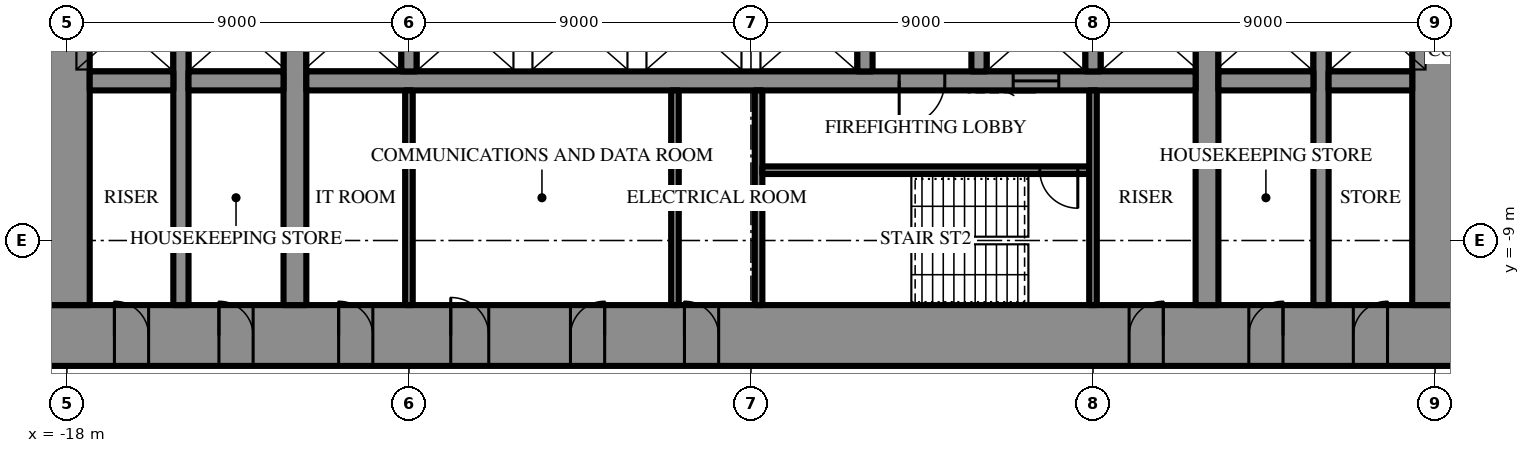
"""IFC4 building model, lengths in metres.
Left out: names, types, materials, properties, quantities, classifications, styles, units other than length and angle.
Written with IfcOpenShell. Run it as: python <this file> out.ifc"""

import sys

from ifc_helpers import new_model, si_unit, direction, frame, frame_2d, origin, place, context, subcontext, project, spatial, rectangle, extrude, element, fill, save


model = new_model("IFC4")
c1 = context("Model", 3, precision=1e-05, world=origin(), true_north=direction((0.0, 1.0)))
c2 = subcontext(c1, "Body", "Model", "MODEL_VIEW")
j1 = project(units=[si_unit("LENGTHUNIT", "METRE"), si_unit("PLANEANGLEUNIT", "RADIAN")], contexts=[c1])
p1 = place(None, origin())
s1 = spatial("IfcSite", under=j1, at=p1, CompositionType="ELEMENT")
p2 = place(p1, origin())
s2 = spatial("IfcBuilding", under=s1, at=p2, CompositionType="ELEMENT")
p3 = place(p2, frame((0.0, 0.0, 61.3)))
s3 = spatial("IfcBuildingStorey", under=s2, at=p3, CompositionType="ELEMENT", Elevation=61.3)
p4 = place(p3, frame((18.6, -11.5, 0.0), z_axis=(0.0, 0.0, 1.0), x_axis=(-1.0, 0.0, 0.0)))
e1 = element("IfcWall", 1, at=p4, inside=s3, PredefinedType="SHEAR", context=c2, shape_type="SweptSolid", body=[
    extrude(rectangle(XDim=37.2, YDim=1.6, at=frame_2d((18.6, 0.0))), origin(), (0.0, 0.0, 1.0), 4.2),
])
p5 = place(p4, frame((19.45, 0.0, 0.0)))
e2 = element("IfcOpeningElement", 2, at=p5, cuts=e1, PredefinedType="OPENING", context=c2, shape_type="SweptSolid", body=[
    extrude(rectangle(XDim=0.9, YDim=2.2, at=frame_2d((0.45, 1.1))), frame((0.0, 0.81, 0.0), z_axis=(0.0, -1.0, 0.0), x_axis=(1.0, 0.0, 0.0)), (0.0, 0.0, 1.0), 1.62),
])
p6 = place(p4, frame((22.45, 0.0, 0.0)))
e3 = element("IfcOpeningElement", 3, at=p6, cuts=e1, PredefinedType="OPENING", context=c2, shape_type="SweptSolid", body=[
    extrude(rectangle(XDim=0.9, YDim=2.2, at=frame_2d((0.45, 1.1))), frame((0.0, 0.81, 0.0), z_axis=(0.0, -1.0, 0.0), x_axis=(1.0, 0.0, 0.0)), (0.0, 0.0, 1.0), 1.62),
])
p7 = place(p4, frame((25.5, 0.0, 0.0)))
e4 = element("IfcOpeningElement", 4, at=p7, cuts=e1, PredefinedType="OPENING", context=c2, shape_type="SweptSolid", body=[
    extrude(rectangle(XDim=1.0, YDim=2.2, at=frame_2d((0.5, 1.1))), frame((0.0, 0.81, 0.0), z_axis=(0.0, -1.0, 0.0), x_axis=(1.0, 0.0, 0.0)), (0.0, 0.0, 1.0), 1.62),
])
p8 = place(p4, frame((1.85, 0.0, 0.0)))
e5 = element("IfcOpeningElement", 5, at=p8, cuts=e1, PredefinedType="OPENING", context=c2, shape_type="SweptSolid", body=[
    extrude(rectangle(XDim=0.9, YDim=2.2, at=frame_2d((0.45, 1.1))), frame((0.0, 0.81, 0.0), z_axis=(0.0, -1.0, 0.0), x_axis=(1.0, 0.0, 0.0)), (0.0, 0.0, 1.0), 1.62),
])
p9 = place(p4, frame((4.6, 0.0, 0.0)))
e6 = element("IfcOpeningElement", 6, at=p9, cuts=e1, PredefinedType="OPENING", context=c2, shape_type="SweptSolid", body=[
    extrude(rectangle(XDim=0.9, YDim=2.2, at=frame_2d((0.45, 1.1))), frame((0.0, 0.81, 0.0), z_axis=(0.0, -1.0, 0.0), x_axis=(1.0, 0.0, 0.0)), (0.0, 0.0, 1.0), 1.62),
])
p10 = place(p4, frame((7.75, 0.0, 0.0)))
e7 = element("IfcOpeningElement", 7, at=p10, cuts=e1, PredefinedType="OPENING", context=c2, shape_type="SweptSolid", body=[
    extrude(rectangle(XDim=0.9, YDim=2.2, at=frame_2d((0.45, 1.1))), frame((0.0, 0.81, 0.0), z_axis=(0.0, -1.0, 0.0), x_axis=(1.0, 0.0, 0.0)), (0.0, 0.0, 1.0), 1.62),
])
p11 = place(p4, frame((28.55, 0.0, 0.0)))
e8 = element("IfcOpeningElement", 8, at=p11, cuts=e1, PredefinedType="OPENING", context=c2, shape_type="SweptSolid", body=[
    extrude(rectangle(XDim=0.9, YDim=2.2, at=frame_2d((0.45, 1.1))), frame((0.0, 0.81, 0.0), z_axis=(0.0, -1.0, 0.0), x_axis=(1.0, 0.0, 0.0)), (0.0, 0.0, 1.0), 1.62),
])
p12 = place(p4, frame((31.7, 0.0, 0.0)))
e9 = element("IfcOpeningElement", 9, at=p12, cuts=e1, PredefinedType="OPENING", context=c2, shape_type="SweptSolid", body=[
    extrude(rectangle(XDim=0.9, YDim=2.2, at=frame_2d((0.45, 1.1))), frame((0.0, 0.81, 0.0), z_axis=(0.0, -1.0, 0.0), x_axis=(1.0, 0.0, 0.0)), (0.0, 0.0, 1.0), 1.62),
])
p13 = place(p4, frame((34.45, 0.0, 0.0)))
e10 = element("IfcOpeningElement", 10, at=p13, cuts=e1, PredefinedType="OPENING", context=c2, shape_type="SweptSolid", body=[
    extrude(rectangle(XDim=0.9, YDim=2.2, at=frame_2d((0.45, 1.1))), frame((0.0, 0.81, 0.0), z_axis=(0.0, -1.0, 0.0), x_axis=(1.0, 0.0, 0.0)), (0.0, 0.0, 1.0), 1.62),
])
p14 = place(p3, frame((18.0, -10.7, 0.0), z_axis=(0.0, 0.0, 1.0), x_axis=(0.0, 1.0, 0.0)))
e11 = element("IfcWall", 11, at=p14, inside=s3, PredefinedType="SHEAR", context=c2, shape_type="SweptSolid", body=[
    extrude(rectangle(XDim=21.4, YDim=1.2, at=frame_2d((10.7, 0.0))), origin(), (0.0, 0.0, 1.0), 4.2),
])
p15 = place(p14, frame((9.8, 0.0, 0.0)))
e12 = element("IfcOpeningElement", 12, at=p15, cuts=e11, PredefinedType="OPENING", context=c2, shape_type="SweptSolid", body=[
    extrude(rectangle(XDim=1.8, YDim=2.4, at=frame_2d((0.9, 1.2))), frame((0.0, 0.61, 0.0), z_axis=(0.0, -1.0, 0.0), x_axis=(1.0, 0.0, 0.0)), (0.0, 0.0, 1.0), 1.22),
])
p16 = place(p3, frame((-18.0, 10.7, 0.0), z_axis=(0.0, 0.0, 1.0), x_axis=(0.0, -1.0, 0.0)))
e13 = element("IfcWall", 13, at=p16, inside=s3, PredefinedType="SHEAR", context=c2, shape_type="SweptSolid", body=[
    extrude(rectangle(XDim=21.4, YDim=1.2, at=frame_2d((10.7, 0.0))), origin(), (0.0, 0.0, 1.0), 4.2),
])
p17 = place(p16, frame((9.8, 0.0, 0.0)))
e14 = element("IfcOpeningElement", 14, at=p17, cuts=e13, PredefinedType="OPENING", context=c2, shape_type="SweptSolid", body=[
    extrude(rectangle(XDim=1.8, YDim=2.4, at=frame_2d((0.9, 1.2))), frame((0.0, 0.61, 0.0), z_axis=(0.0, -1.0, 0.0), x_axis=(1.0, 0.0, 0.0)), (0.0, 0.0, 1.0), 1.22),
])
p18 = place(p3, frame((12.0, -10.7, 0.0), z_axis=(0.0, 0.0, 1.0), x_axis=(0.0, 1.0, 0.0)))
e15 = element("IfcWall", 15, at=p18, inside=s3, PredefinedType="SHEAR", context=c2, shape_type="SweptSolid", body=[
    extrude(rectangle(XDim=21.4, YDim=0.6, at=frame_2d((10.7, 0.0))), origin(), (0.0, 0.0, 1.0), 4.2),
])
p19 = place(p18, frame((9.8, 0.0, 0.0)))
e16 = element("IfcOpeningElement", 16, at=p19, cuts=e15, PredefinedType="OPENING", context=c2, shape_type="SweptSolid", body=[
    extrude(rectangle(XDim=1.8, YDim=2.4, at=frame_2d((0.9, 1.2))), frame((0.0, 0.31, 0.0), z_axis=(0.0, -1.0, 0.0), x_axis=(1.0, 0.0, 0.0)), (0.0, 0.0, 1.0), 0.62),
])
p20 = place(p3, frame((-12.0, -10.7, 0.0), z_axis=(0.0, 0.0, 1.0), x_axis=(0.0, 1.0, 0.0)))
e17 = element("IfcWall", 17, at=p20, inside=s3, PredefinedType="SHEAR", context=c2, shape_type="SweptSolid", body=[
    extrude(rectangle(XDim=21.4, YDim=0.6, at=frame_2d((10.7, 0.0))), origin(), (0.0, 0.0, 1.0), 4.2),
])
p21 = place(p20, frame((9.8, 0.0, 0.0)))
e18 = element("IfcOpeningElement", 18, at=p21, cuts=e17, PredefinedType="OPENING", context=c2, shape_type="SweptSolid", body=[
    extrude(rectangle(XDim=1.8, YDim=2.4, at=frame_2d((0.9, 1.2))), frame((0.0, 0.31, 0.0), z_axis=(0.0, -1.0, 0.0), x_axis=(1.0, 0.0, 0.0)), (0.0, 0.0, 1.0), 0.62),
])
p22 = place(p3, frame((15.0, -10.7, 0.0), z_axis=(0.0, 0.0, 1.0), x_axis=(0.0, 1.0, 0.0)))
e19 = element("IfcWall", 19, at=p22, inside=s3, PredefinedType="SHEAR", context=c2, shape_type="SweptSolid", body=[
    extrude(rectangle(XDim=21.4, YDim=0.4, at=frame_2d((10.7, 0.0))), origin(), (0.0, 0.0, 1.0), 4.2),
])
p23 = place(p22, frame((9.8, 0.0, 0.0)))
e20 = element("IfcOpeningElement", 20, at=p23, cuts=e19, PredefinedType="OPENING", context=c2, shape_type="SweptSolid", body=[
    extrude(rectangle(XDim=1.8, YDim=2.4, at=frame_2d((0.9, 1.2))), frame((0.0, 0.21, 0.0), z_axis=(0.0, -1.0, 0.0), x_axis=(1.0, 0.0, 0.0)), (0.0, 0.0, 1.0), 0.42),
])
p24 = place(p3, frame((-15.0, -10.7, 0.0), z_axis=(0.0, 0.0, 1.0), x_axis=(0.0, 1.0, 0.0)))
e21 = element("IfcWall", 21, at=p24, inside=s3, PredefinedType="SHEAR", context=c2, shape_type="SweptSolid", body=[
    extrude(rectangle(XDim=21.4, YDim=0.4, at=frame_2d((10.7, 0.0))), origin(), (0.0, 0.0, 1.0), 4.2),
])
p25 = place(p24, frame((9.8, 0.0, 0.0)))
e22 = element("IfcOpeningElement", 22, at=p25, cuts=e21, PredefinedType="OPENING", context=c2, shape_type="SweptSolid", body=[
    extrude(rectangle(XDim=1.8, YDim=2.4, at=frame_2d((0.9, 1.2))), frame((0.0, 0.21, 0.0), z_axis=(0.0, -1.0, 0.0), x_axis=(1.0, 0.0, 0.0)), (0.0, 0.0, 1.0), 0.42),
])
p26 = place(p3, frame((17.4, -4.8, 0.0), z_axis=(0.0, 0.0, 1.0), x_axis=(-1.0, 0.0, 0.0)))
e23 = element("IfcWall", 23, at=p26, inside=s3, PredefinedType="SHEAR", context=c2, shape_type="SweptSolid", body=[
    extrude(rectangle(XDim=2.2, YDim=0.5, at=frame_2d((1.1, 0.0))), origin(), (0.0, 0.0, 1.0), 4.2),
])
p27 = place(p3, frame((14.8, -4.8, 0.0), z_axis=(0.0, 0.0, 1.0), x_axis=(-1.0, 0.0, 0.0)))
e24 = element("IfcWall", 24, at=p27, inside=s3, PredefinedType="SHEAR", context=c2, shape_type="SweptSolid", body=[
    extrude(rectangle(XDim=2.5, YDim=0.5, at=frame_2d((1.25, 0.0))), origin(), (0.0, 0.0, 1.0), 4.2),
])
p28 = place(p3, frame((11.7, -4.8, 0.0), z_axis=(0.0, 0.0, 1.0), x_axis=(-1.0, 0.0, 0.0)))
e25 = element("IfcWall", 25, at=p28, inside=s3, PredefinedType="SHEAR", context=c2, shape_type="SweptSolid", body=[
    extrude(rectangle(XDim=23.4, YDim=0.5, at=frame_2d((11.7, 0.0))), origin(), (0.0, 0.0, 1.0), 4.2),
])
p29 = place(p28, frame((6.6, 0.0, 0.0)))
e26 = element("IfcOpeningElement", 26, at=p29, cuts=e25, PredefinedType="OPENING", context=c2, shape_type="SweptSolid", body=[
    extrude(rectangle(XDim=1.2, YDim=2.2, at=frame_2d((0.6, 1.1))), frame((0.0, 0.26, 0.0), z_axis=(0.0, -1.0, 0.0), x_axis=(1.0, 0.0, 0.0)), (0.0, 0.0, 1.0), 0.52),
])
p30 = place(p28, frame((3.6, 0.0, 0.0)))
e27 = element("IfcOpeningElement", 27, at=p30, cuts=e25, PredefinedType="OPENING", context=c2, shape_type="SweptSolid", body=[
    extrude(rectangle(XDim=1.2, YDim=2.2, at=frame_2d((0.6, 1.1))), frame((0.0, 0.26, 0.0), z_axis=(0.0, -1.0, 0.0), x_axis=(1.0, 0.0, 0.0)), (0.0, 0.0, 1.0), 0.52),
])
p31 = place(p3, frame((-12.3, -4.8, 0.0), z_axis=(0.0, 0.0, 1.0), x_axis=(-1.0, 0.0, 0.0)))
e28 = element("IfcWall", 28, at=p31, inside=s3, PredefinedType="SHEAR", context=c2, shape_type="SweptSolid", body=[
    extrude(rectangle(XDim=2.5, YDim=0.5, at=frame_2d((1.25, 0.0))), origin(), (0.0, 0.0, 1.0), 4.2),
])
p32 = place(p3, frame((-15.2, -4.8, 0.0), z_axis=(0.0, 0.0, 1.0), x_axis=(-1.0, 0.0, 0.0)))
e29 = element("IfcWall", 29, at=p32, inside=s3, PredefinedType="SHEAR", context=c2, shape_type="SweptSolid", body=[
    extrude(rectangle(XDim=2.2, YDim=0.5, at=frame_2d((1.1, 0.0))), origin(), (0.0, 0.0, 1.0), 4.2),
])
for number, where, z_axis, x_axis in (
    (30, (9.0, -2.25, 0.0), (0.0, 0.0, 1.0), (0.0, -1.0, 0.0)),
    (31, (6.0, -2.25, 0.0), (0.0, 0.0, 1.0), (0.0, -1.0, 0.0)),
    (32, (3.0, -2.25, 0.0), (0.0, 0.0, 1.0), (0.0, -1.0, 0.0)),
    (33, (-9.0, -2.25, 0.0), (0.0, 0.0, 1.0), (0.0, -1.0, 0.0)),
):
    element("IfcWall", number, at=place(p3, frame(where, z_axis=z_axis, x_axis=x_axis)), inside=s3, PredefinedType="SHEAR", context=c2, shape_type="SweptSolid", body=[
        extrude(rectangle(XDim=2.3, YDim=0.4, at=frame_2d((1.15, 0.0))), origin(), (0.0, 0.0, 1.0), 4.2),
    ])
p33 = place(p3, frame((0.2, -5.05, 0.0), z_axis=(0.0, 0.0, 1.0), x_axis=(0.0, -1.0, 0.0)))
e34 = element("IfcWall", 34, at=p33, inside=s3, PredefinedType="SHEAR", context=c2, shape_type="SweptSolid", body=[
    extrude(rectangle(XDim=5.65, YDim=0.2, at=frame_2d((2.825, 0.0))), origin(), (0.0, 0.0, 1.0), 4.2),
])
p34 = place(p3, frame((8.9, -7.15, 0.0), z_axis=(0.0, 0.0, 1.0), x_axis=(-1.0, 0.0, 0.0)))
e35 = element("IfcWall", 35, at=p34, inside=s3, PredefinedType="SHEAR", context=c2, shape_type="SweptSolid", body=[
    extrude(rectangle(XDim=8.6, YDim=0.2, at=frame_2d((4.3, 0.0))), origin(), (0.0, 0.0, 1.0), 4.2),
])
p35 = place(p34, frame((0.3, 0.0, 0.0)))
e36 = element("IfcOpeningElement", 36, at=p35, cuts=e35, PredefinedType="OPENING", context=c2, shape_type="SweptSolid", body=[
    extrude(rectangle(XDim=1.0, YDim=2.2, at=frame_2d((0.5, 1.1))), frame((0.0, 0.11, 0.0), z_axis=(0.0, -1.0, 0.0), x_axis=(1.0, 0.0, 0.0)), (0.0, 0.0, 1.0), 0.22),
])
for number, where, z_axis, x_axis in (
    (37, (9.0, -5.05, 0.0), (0.0, 0.0, 1.0), (0.0, -1.0, 0.0)),
    (38, (-9.0, -5.05, 0.0), (0.0, 0.0, 1.0), (0.0, -1.0, 0.0)),
    (39, (-2.0, -5.05, 0.0), (0.0, 0.0, 1.0), (0.0, -1.0, 0.0)),
):
    element("IfcWall", number, at=place(p3, frame(where, z_axis=z_axis, x_axis=x_axis)), inside=s3, PredefinedType="PARTITIONING", context=c2, shape_type="SweptSolid", body=[
        extrude(rectangle(XDim=5.65, YDim=0.2, at=frame_2d((2.825, 0.0))), origin(), (0.0, 0.0, 1.0), 4.0),
    ])
p36 = place(p3, frame((17.511, -22.67, 0.0), z_axis=(0.0, 0.0, 1.0), x_axis=(0.500000289772, 0.866025236485, 0.0)))
e40 = element("IfcWall", 40, at=p36, inside=s3, PredefinedType="PARTITIONING", context=c2, shape_type="SweptSolid", body=[
    extrude(rectangle(XDim=21.754, YDim=0.2, at=frame_2d((10.877, 0.0))), origin(), (0.0, 0.0, 1.0), 4.0),
])
p37 = place(p36, frame((4.589, 0.0, 0.0)))
e41 = element("IfcOpeningElement", 41, at=p37, cuts=e40, PredefinedType="OPENING", context=c2, shape_type="SweptSolid", body=[
    extrude(rectangle(XDim=1.8, YDim=2.4, at=frame_2d((0.9, 1.2))), frame((0.0, 0.11, 0.0), z_axis=(0.0, -1.0, 0.0), x_axis=(1.0, 0.0, 0.0)), (0.0, 0.0, 1.0), 0.22),
])
p38 = place(p36, frame((15.366, 0.0, 0.0)))
e42 = element("IfcOpeningElement", 42, at=p38, cuts=e40, PredefinedType="OPENING", context=c2, shape_type="SweptSolid", body=[
    extrude(rectangle(XDim=1.8, YDim=2.4, at=frame_2d((0.9, 1.2))), frame((0.0, 0.11, 0.0), z_axis=(0.0, -1.0, 0.0), x_axis=(1.0, 0.0, 0.0)), (0.0, 0.0, 1.0), 0.22),
])
p39 = place(p29, origin())
e43 = element("IfcDoor", 43, at=p39, inside=s3, OperationType="SINGLE_SWING_LEFT", PredefinedType="DOOR", context=c2, shape_type="SweptSolid", body=[
    extrude(rectangle(XDim=1.2, YDim=2.2, at=frame_2d((0.6, 1.1))), frame((0.0, 0.025, 0.0), z_axis=(0.0, -1.0, 0.0), x_axis=(1.0, 0.0, 0.0)), (0.0, 0.0, 1.0), 0.05),
])
fill(e26, e43)
p40 = place(p35, origin())
e44 = element("IfcDoor", 44, at=p40, inside=s3, OperationType="SINGLE_SWING_RIGHT", PredefinedType="DOOR", context=c2, shape_type="SweptSolid", body=[
    extrude(rectangle(XDim=1.0, YDim=2.2, at=frame_2d((0.5, 1.1))), frame((0.0, 0.025, 0.0), z_axis=(0.0, -1.0, 0.0), x_axis=(1.0, 0.0, 0.0)), (0.0, 0.0, 1.0), 0.05),
])
fill(e36, e44)
p41 = place(p5, frame((0.9, 0.0, 0.0), z_axis=(0.0, 0.0, 1.0), x_axis=(-1.0, 0.0, 0.0)))
e45 = element("IfcDoor", 45, at=p41, inside=s3, OperationType="SINGLE_SWING_RIGHT", PredefinedType="DOOR", context=c2, shape_type="SweptSolid", body=[
    extrude(rectangle(XDim=0.9, YDim=2.2, at=frame_2d((0.45, 1.1))), frame((0.0, 0.025, 0.0), z_axis=(0.0, -1.0, 0.0), x_axis=(1.0, 0.0, 0.0)), (0.0, 0.0, 1.0), 0.05),
])
fill(e2, e45)
p42 = place(p6, frame((0.9, 0.0, 0.0), z_axis=(0.0, 0.0, 1.0), x_axis=(-1.0, 0.0, 0.0)))
e46 = element("IfcDoor", 46, at=p42, inside=s3, OperationType="SINGLE_SWING_LEFT", PredefinedType="DOOR", context=c2, shape_type="SweptSolid", body=[
    extrude(rectangle(XDim=0.9, YDim=2.2, at=frame_2d((0.45, 1.1))), frame((0.0, 0.025, 0.0), z_axis=(0.0, -1.0, 0.0), x_axis=(1.0, 0.0, 0.0)), (0.0, 0.0, 1.0), 0.05),
])
fill(e3, e46)
p43 = place(p7, frame((1.0, 0.0, 0.0), z_axis=(0.0, 0.0, 1.0), x_axis=(-1.0, 0.0, 0.0)))
e47 = element("IfcDoor", 47, at=p43, inside=s3, OperationType="SINGLE_SWING_RIGHT", PredefinedType="DOOR", context=c2, shape_type="SweptSolid", body=[
    extrude(rectangle(XDim=1.0, YDim=2.2, at=frame_2d((0.5, 1.1))), frame((0.0, 0.025, 0.0), z_axis=(0.0, -1.0, 0.0), x_axis=(1.0, 0.0, 0.0)), (0.0, 0.0, 1.0), 0.05),
])
fill(e4, e47)
p44 = place(p8, frame((0.9, 0.0, 0.0), z_axis=(0.0, 0.0, 1.0), x_axis=(-1.0, 0.0, 0.0)))
e48 = element("IfcDoor", 48, at=p44, inside=s3, OperationType="SINGLE_SWING_LEFT", PredefinedType="DOOR", context=c2, shape_type="SweptSolid", body=[
    extrude(rectangle(XDim=0.9, YDim=2.2, at=frame_2d((0.45, 1.1))), frame((0.0, 0.025, 0.0), z_axis=(0.0, -1.0, 0.0), x_axis=(1.0, 0.0, 0.0)), (0.0, 0.0, 1.0), 0.05),
])
fill(e5, e48)
p45 = place(p9, frame((0.9, 0.0, 0.0), z_axis=(0.0, 0.0, 1.0), x_axis=(-1.0, 0.0, 0.0)))
e49 = element("IfcDoor", 49, at=p45, inside=s3, OperationType="SINGLE_SWING_LEFT", PredefinedType="DOOR", context=c2, shape_type="SweptSolid", body=[
    extrude(rectangle(XDim=0.9, YDim=2.2, at=frame_2d((0.45, 1.1))), frame((0.0, 0.025, 0.0), z_axis=(0.0, -1.0, 0.0), x_axis=(1.0, 0.0, 0.0)), (0.0, 0.0, 1.0), 0.05),
])
fill(e6, e49)
p46 = place(p10, frame((0.9, 0.0, 0.0), z_axis=(0.0, 0.0, 1.0), x_axis=(-1.0, 0.0, 0.0)))
e50 = element("IfcDoor", 50, at=p46, inside=s3, OperationType="SINGLE_SWING_LEFT", PredefinedType="DOOR", context=c2, shape_type="SweptSolid", body=[
    extrude(rectangle(XDim=0.9, YDim=2.2, at=frame_2d((0.45, 1.1))), frame((0.0, 0.025, 0.0), z_axis=(0.0, -1.0, 0.0), x_axis=(1.0, 0.0, 0.0)), (0.0, 0.0, 1.0), 0.05),
])
fill(e7, e50)
p47 = place(p11, frame((0.9, 0.0, 0.0), z_axis=(0.0, 0.0, 1.0), x_axis=(-1.0, 0.0, 0.0)))
e51 = element("IfcDoor", 51, at=p47, inside=s3, OperationType="SINGLE_SWING_RIGHT", PredefinedType="DOOR", context=c2, shape_type="SweptSolid", body=[
    extrude(rectangle(XDim=0.9, YDim=2.2, at=frame_2d((0.45, 1.1))), frame((0.0, 0.025, 0.0), z_axis=(0.0, -1.0, 0.0), x_axis=(1.0, 0.0, 0.0)), (0.0, 0.0, 1.0), 0.05),
])
fill(e8, e51)
p48 = place(p12, frame((0.9, 0.0, 0.0), z_axis=(0.0, 0.0, 1.0), x_axis=(-1.0, 0.0, 0.0)))
e52 = element("IfcDoor", 52, at=p48, inside=s3, OperationType="SINGLE_SWING_RIGHT", PredefinedType="DOOR", context=c2, shape_type="SweptSolid", body=[
    extrude(rectangle(XDim=0.9, YDim=2.2, at=frame_2d((0.45, 1.1))), frame((0.0, 0.025, 0.0), z_axis=(0.0, -1.0, 0.0), x_axis=(1.0, 0.0, 0.0)), (0.0, 0.0, 1.0), 0.05),
])
fill(e9, e52)
p49 = place(p13, frame((0.9, 0.0, 0.0), z_axis=(0.0, 0.0, 1.0), x_axis=(-1.0, 0.0, 0.0)))
e53 = element("IfcDoor", 53, at=p49, inside=s3, OperationType="SINGLE_SWING_RIGHT", PredefinedType="DOOR", context=c2, shape_type="SweptSolid", body=[
    extrude(rectangle(XDim=0.9, YDim=2.2, at=frame_2d((0.45, 1.1))), frame((0.0, 0.025, 0.0), z_axis=(0.0, -1.0, 0.0), x_axis=(1.0, 0.0, 0.0)), (0.0, 0.0, 1.0), 0.05),
])
fill(e10, e53)
p50 = place(p30, origin())
e54 = element("IfcDoor", 54, at=p50, inside=s3, OperationType="SLIDING_TO_LEFT", PredefinedType="DOOR", context=c2, shape_type="SweptSolid", body=[
    extrude(rectangle(XDim=1.2, YDim=2.2, at=frame_2d((0.6, 1.1))), frame((0.0, 0.025, 0.0), z_axis=(0.0, -1.0, 0.0), x_axis=(1.0, 0.0, 0.0)), (0.0, 0.0, 1.0), 0.05),
])
fill(e27, e54)
save(model, sys.argv[1])
